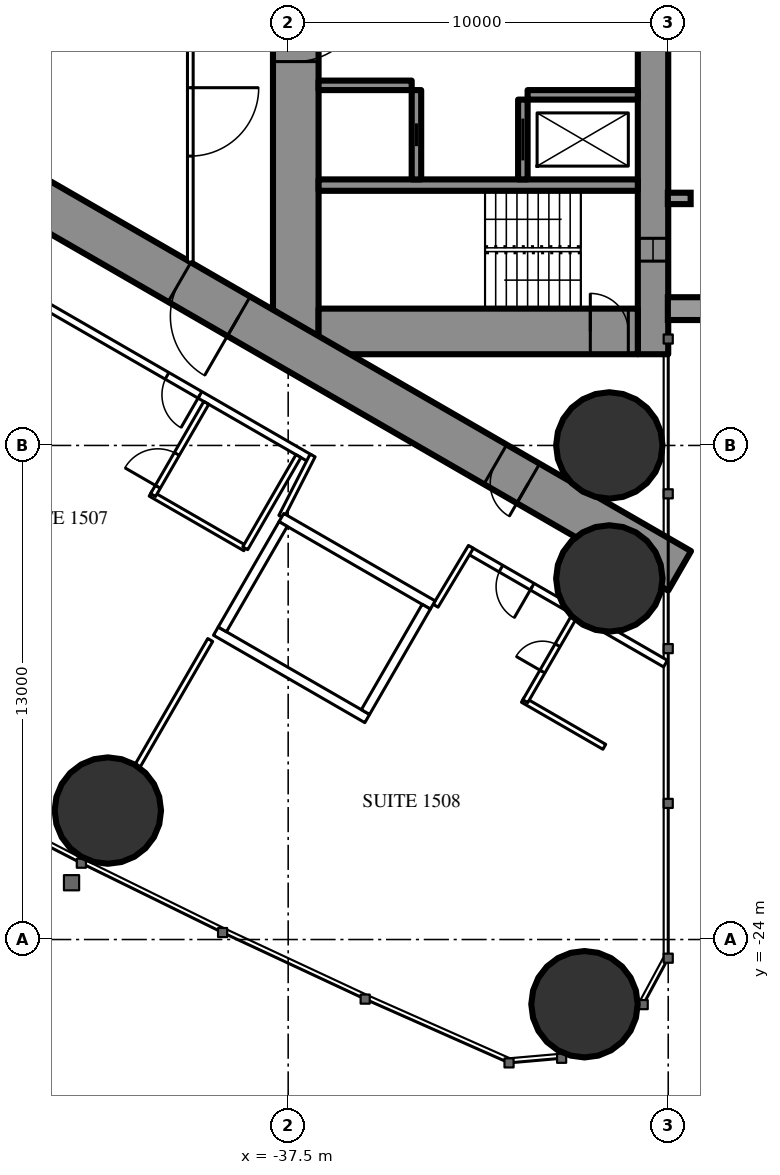
"""IFC4 building model, lengths in metres.
Left out: names, types, materials, properties, quantities, classifications, styles, units other than length and angle.
Written with IfcOpenShell. Run it as: python <this file> out.ifc"""

import sys

from ifc_helpers import new_model, si_unit, direction, frame, frame_2d, origin, origin_2d, place, context, subcontext, project, spatial, rectangle, hollow_circle, extrude, element, fill, save


model = new_model("IFC4")
c1 = context("Model", 3, precision=1e-05, world=origin(), true_north=direction((0.0, 1.0)))
c2 = subcontext(c1, "Body", "Model", "MODEL_VIEW")
j1 = project(units=[si_unit("LENGTHUNIT", "METRE"), si_unit("PLANEANGLEUNIT", "RADIAN")], contexts=[c1])
p1 = place(None, origin())
s1 = spatial("IfcSite", under=j1, at=p1, CompositionType="ELEMENT")
p2 = place(p1, origin())
s2 = spatial("IfcBuilding", under=s1, at=p2, CompositionType="ELEMENT")
p3 = place(p2, frame((0.0, 0.0, 60.0)))
s3 = spatial("IfcBuildingStorey", under=s2, at=p3, CompositionType="ELEMENT", Elevation=60.0)
for number, where, z_axis, x_axis in (
    (1, (-29.703, -25.703, 0.0), (0.0, 0.0, 1.0), (1.0, 0.0, 0.0)),
    (2, (-29.05, -11.0, 0.0), (0.0, 0.0, 1.0), (1.0, 0.0, 0.0)),
    (3, (-29.05, -14.5, 0.0), (0.0, 0.0, 1.0), (1.0, 0.0, 0.0)),
    (4, (-42.245, -20.607, 0.0), (0.0, 0.0, 1.0), (1.0, 0.0, 0.0)),
):
    element("IfcColumn", number, at=place(p3, frame(where, z_axis=z_axis, x_axis=x_axis)), inside=s3, PredefinedType="COLUMN", context=c2, shape_type="SweptSolid", body=[
        extrude(hollow_circle(Radius=1.4, WallThickness=0.12, at=origin_2d()), origin(), (0.0, 0.0, 1.0), 3.5),
    ])
p4 = place(p3, frame((-27.9, 8.6, 0.0), z_axis=(0.0, 0.0, 1.0), x_axis=(0.0, -1.0, 0.0)))
e5 = element("IfcWall", 5, at=p4, inside=s3, PredefinedType="SHEAR", context=c2, shape_type="SweptSolid", body=[
    extrude(rectangle(XDim=17.2, YDim=0.8, at=frame_2d((8.6, 0.0))), origin(), (0.0, 0.0, 1.0), 3.5),
])
p5 = place(p4, frame((2.45, 0.0, 0.6)))
e6 = element("IfcOpeningElement", 6, at=p5, cuts=e5, PredefinedType="OPENING", context=c2, shape_type="SweptSolid", body=[
    extrude(rectangle(XDim=0.6, YDim=2.1, at=frame_2d((0.3, 1.05))), frame((0.0, 0.41, 0.0), z_axis=(0.0, -1.0, 0.0), x_axis=(1.0, 0.0, 0.0)), (0.0, 0.0, 1.0), 0.82),
])
p6 = place(p4, frame((14.15, 0.0, 0.6)))
e7 = element("IfcOpeningElement", 7, at=p6, cuts=e5, PredefinedType="OPENING", context=c2, shape_type="SweptSolid", body=[
    extrude(rectangle(XDim=0.6, YDim=2.1, at=frame_2d((0.3, 1.05))), frame((0.0, 0.41, 0.0), z_axis=(0.0, -1.0, 0.0), x_axis=(1.0, 0.0, 0.0)), (0.0, 0.0, 1.0), 0.82),
])
p7 = place(p3, frame((-37.3, 8.6, 0.0), z_axis=(0.0, 0.0, 1.0), x_axis=(0.0, -1.0, 0.0)))
e8 = element("IfcWall", 8, at=p7, inside=s3, PredefinedType="SHEAR", context=c2, shape_type="SweptSolid", body=[
    extrude(rectangle(XDim=17.2, YDim=1.2, at=frame_2d((8.6, 0.0))), origin(), (0.0, 0.0, 1.0), 3.5),
])
p8 = place(p7, frame((7.7, 0.0, 0.0)))
e9 = element("IfcOpeningElement", 9, at=p8, cuts=e8, PredefinedType="OPENING", context=c2, shape_type="SweptSolid", body=[
    extrude(rectangle(XDim=1.8, YDim=2.2, at=frame_2d((0.9, 1.1))), frame((0.0, 0.61, 0.0), z_axis=(0.0, -1.0, 0.0), x_axis=(1.0, 0.0, 0.0)), (0.0, 0.0, 1.0), 1.22),
])
p9 = place(p3, frame((-28.3, -8.0, 0.0), z_axis=(0.0, 0.0, 1.0), x_axis=(-1.0, 0.0, 0.0)))
e10 = element("IfcWall", 10, at=p9, inside=s3, PredefinedType="SHEAR", context=c2, shape_type="SweptSolid", body=[
    extrude(rectangle(XDim=8.4, YDim=1.2, at=frame_2d((4.2, 0.0))), origin(), (0.0, 0.0, 1.0), 3.5),
])
p10 = place(p9, frame((0.25, 0.0, 0.0)))
e11 = element("IfcOpeningElement", 11, at=p10, cuts=e10, PredefinedType="OPENING", context=c2, shape_type="SweptSolid", body=[
    extrude(rectangle(XDim=1.0, YDim=2.2, at=frame_2d((0.5, 1.1))), frame((0.0, 0.61, 0.0), z_axis=(0.0, -1.0, 0.0), x_axis=(1.0, 0.0, 0.0)), (0.0, 0.0, 1.0), 1.22),
])
p11 = place(p3, frame((-28.3, -4.15, 0.0), z_axis=(0.0, 0.0, 1.0), x_axis=(-1.0, 0.0, 0.0)))
e12 = element("IfcWall", 12, at=p11, inside=s3, PredefinedType="SHEAR", context=c2, shape_type="SweptSolid", body=[
    extrude(rectangle(XDim=8.4, YDim=0.3, at=frame_2d((4.2, 0.0))), origin(), (0.0, 0.0, 1.0), 3.5),
])
p12 = place(p3, frame((-31.325, -1.9, 0.0), z_axis=(0.0, 0.0, 1.0), x_axis=(0.0, -1.0, 0.0)))
e13 = element("IfcWall", 13, at=p12, inside=s3, PredefinedType="SHEAR", context=c2, shape_type="SweptSolid", body=[
    extrude(rectangle(XDim=2.1, YDim=0.25, at=frame_2d((1.05, 0.0))), origin(), (0.0, 0.0, 1.0), 3.5),
])
p13 = place(p12, frame((0.5, 0.0, 0.0)))
e14 = element("IfcOpeningElement", 14, at=p13, cuts=e13, PredefinedType="OPENING", context=c2, shape_type="SweptSolid", body=[
    extrude(rectangle(XDim=1.1, YDim=2.2, at=frame_2d((0.55, 1.1))), frame((0.0, 0.135, 0.0), z_axis=(0.0, -1.0, 0.0), x_axis=(1.0, 0.0, 0.0)), (0.0, 0.0, 1.0), 0.27),
])
p14 = place(p3, frame((-34.125, -1.65, 0.0), z_axis=(0.0, 0.0, 1.0), x_axis=(0.0, -1.0, 0.0)))
e15 = element("IfcWall", 15, at=p14, inside=s3, PredefinedType="SHEAR", context=c2, shape_type="SweptSolid", body=[
    extrude(rectangle(XDim=2.35, YDim=0.25, at=frame_2d((1.175, 0.0))), origin(), (0.0, 0.0, 1.0), 3.5),
])
p15 = place(p14, frame((0.875, 0.0, 0.0)))
e16 = element("IfcOpeningElement", 16, at=p15, cuts=e15, PredefinedType="OPENING", context=c2, shape_type="SweptSolid", body=[
    extrude(rectangle(XDim=0.6, YDim=2.0, at=frame_2d((0.3, 1.0))), frame((0.0, 0.135, 0.0), z_axis=(0.0, -1.0, 0.0), x_axis=(1.0, 0.0, 0.0)), (0.0, 0.0, 1.0), 0.27),
])
p16 = place(p3, frame((-28.3, -1.775, 0.0), z_axis=(0.0, 0.0, 1.0), x_axis=(-1.0, 0.0, 0.0)))
e17 = element("IfcWall", 17, at=p16, inside=s3, PredefinedType="SHEAR", context=c2, shape_type="SweptSolid", body=[
    extrude(rectangle(XDim=2.9, YDim=0.25, at=frame_2d((1.45, 0.0))), origin(), (0.0, 0.0, 1.0), 3.5),
])
p17 = place(p3, frame((-34.25, -1.525, 0.0), z_axis=(0.0, 0.0, 1.0), x_axis=(-1.0, 0.0, 0.0)))
e18 = element("IfcWall", 18, at=p17, inside=s3, PredefinedType="SHEAR", context=c2, shape_type="SweptSolid", body=[
    extrude(rectangle(XDim=2.45, YDim=0.25, at=frame_2d((1.225, 0.0))), origin(), (0.0, 0.0, 1.0), 3.5),
])
p18 = place(p3, frame((-27.2, 14.3, 0.0), z_axis=(0.0, 0.0, 1.0), x_axis=(-0.866026593062, -0.499997940104, 0.0)))
e19 = element("IfcWall", 19, at=p18, inside=s3, PredefinedType="SHEAR", context=c2, shape_type="SweptSolid", body=[
    extrude(rectangle(XDim=28.946, YDim=1.2, at=frame_2d((14.473, 0.0))), origin(), (0.0, 0.0, 1.0), 3.5),
])
p19 = place(p18, frame((4.6, 0.0, 0.0)))
e20 = element("IfcOpeningElement", 20, at=p19, cuts=e19, PredefinedType="OPENING", context=c2, shape_type="SweptSolid", body=[
    extrude(rectangle(XDim=1.0, YDim=2.2, at=frame_2d((0.5, 1.1))), frame((0.0, 0.61, 0.0), z_axis=(0.0, -1.0, 0.0), x_axis=(1.0, 0.0, 0.0)), (0.0, 0.0, 1.0), 1.22),
])
p20 = place(p18, frame((13.395, 0.0, 0.0)))
e21 = element("IfcOpeningElement", 21, at=p20, cuts=e19, PredefinedType="OPENING", context=c2, shape_type="SweptSolid", body=[
    extrude(rectangle(XDim=1.8, YDim=2.2, at=frame_2d((0.9, 1.1))), frame((0.0, 0.61, 0.0), z_axis=(0.0, -1.0, 0.0), x_axis=(1.0, 0.0, 0.0)), (0.0, 0.0, 1.0), 1.22),
])
p21 = place(p3, frame((-27.2, -14.3, 0.0), z_axis=(0.0, 0.0, 1.0), x_axis=(-0.866024021859, 0.500002393557, 0.0)))
e22 = element("IfcWall", 22, at=p21, inside=s3, PredefinedType="SHEAR", context=c2, shape_type="SweptSolid", body=[
    extrude(rectangle(XDim=27.907, YDim=1.2, at=frame_2d((13.954, 0.0))), origin(), (0.0, 0.0, 1.0), 3.5),
])
p22 = place(p21, frame((4.6, 0.0, 0.0)))
e23 = element("IfcOpeningElement", 23, at=p22, cuts=e22, PredefinedType="OPENING", context=c2, shape_type="SweptSolid", body=[
    extrude(rectangle(XDim=1.0, YDim=2.2, at=frame_2d((0.5, 1.1))), frame((0.0, 0.61, 0.0), z_axis=(0.0, -1.0, 0.0), x_axis=(1.0, 0.0, 0.0)), (0.0, 0.0, 1.0), 1.22),
])
p23 = place(p21, frame((13.395, 0.0, 0.0)))
e24 = element("IfcOpeningElement", 24, at=p23, cuts=e22, PredefinedType="OPENING", context=c2, shape_type="SweptSolid", body=[
    extrude(rectangle(XDim=1.8, YDim=2.2, at=frame_2d((0.9, 1.1))), frame((0.0, 0.61, 0.0), z_axis=(0.0, -1.0, 0.0), x_axis=(1.0, 0.0, 0.0)), (0.0, 0.0, 1.0), 1.22),
])
p24 = place(p3, frame((-39.551, -16.118, 0.0), z_axis=(0.0, 0.0, 1.0), x_axis=(-0.499986503906, -0.866033195618, 0.0)))
e25 = element("IfcWall", 25, at=p24, inside=s3, PredefinedType="PARTITIONING", context=c2, shape_type="SweptSolid", body=[
    extrude(rectangle(XDim=3.815, YDim=0.15, at=frame_2d((1.907, 0.0))), origin(), (0.0, 0.0, 1.0), 3.25),
])
p25 = place(p3, frame((-27.572, -16.741, 0.0), z_axis=(0.0, 0.0, 1.0), x_axis=(-0.866024464444, 0.500001626982, 0.0)))
e26 = element("IfcWall", 26, at=p25, inside=s3, PredefinedType="PARTITIONING", context=c2, shape_type="SweptSolid", body=[
    extrude(rectangle(XDim=5.955, YDim=0.2, at=frame_2d((2.978, 0.0))), origin(), (0.0, 0.0, 1.0), 3.25),
])
p26 = place(p25, frame((4.05, 0.0, 0.0)))
e27 = element("IfcOpeningElement", 27, at=p26, cuts=e26, PredefinedType="OPENING", context=c2, shape_type="SweptSolid", body=[
    extrude(rectangle(XDim=0.95, YDim=2.2, at=frame_2d((0.475, 1.1))), frame((0.0, 0.11, 0.0), z_axis=(0.0, -1.0, 0.0), x_axis=(1.0, 0.0, 0.0)), (0.0, 0.0, 1.0), 0.22),
])
p27 = place(p3, frame((-36.92, -11.344, 0.0), z_axis=(0.0, 0.0, 1.0), x_axis=(-0.866028313256, 0.499994960614, 0.0)))
e28 = element("IfcWall", 28, at=p27, inside=s3, PredefinedType="PARTITIONING", context=c2, shape_type="SweptSolid", body=[
    extrude(rectangle(XDim=22.568, YDim=0.2, at=frame_2d((11.284, 0.0))), origin(), (0.0, 0.0, 1.0), 3.25),
])
p28 = place(p27, frame((12.68, 0.0, 0.0)))
e29 = element("IfcOpeningElement", 29, at=p28, cuts=e28, PredefinedType="OPENING", context=c2, shape_type="SweptSolid", body=[
    extrude(rectangle(XDim=0.95, YDim=2.2, at=frame_2d((0.475, 1.1))), frame((0.0, 0.11, 0.0), z_axis=(0.0, -1.0, 0.0), x_axis=(1.0, 0.0, 0.0)), (0.0, 0.0, 1.0), 0.22),
])
p29 = place(p27, frame((3.35, 0.0, 0.0)))
e30 = element("IfcOpeningElement", 30, at=p29, cuts=e28, PredefinedType="OPENING", context=c2, shape_type="SweptSolid", body=[
    extrude(rectangle(XDim=1.0, YDim=2.2, at=frame_2d((0.5, 1.1))), frame((0.0, 0.11, 0.0), z_axis=(0.0, -1.0, 0.0), x_axis=(1.0, 0.0, 0.0)), (0.0, 0.0, 1.0), 0.22),
])
p30 = place(p3, frame((-36.857, -11.265, 0.0), z_axis=(0.0, 0.0, 1.0), x_axis=(-0.454225294761, -0.890886851176, 0.0)))
e31 = element("IfcWall", 31, at=p30, inside=s3, PredefinedType="PARTITIONING", context=c2, shape_type="SweptSolid", body=[
    extrude(rectangle(XDim=1.807, YDim=0.15, at=frame_2d((0.904, 0.0))), origin(), (0.0, 0.0, 1.0), 3.25),
])
p31 = place(p3, frame((-33.621, -15.218, 0.0), z_axis=(0.0, 0.0, 1.0), x_axis=(0.514336634837, 0.857588377991, 0.0)))
e32 = element("IfcWall", 32, at=p31, inside=s3, PredefinedType="PARTITIONING", context=c2, shape_type="SweptSolid", body=[
    extrude(rectangle(XDim=1.805, YDim=0.15, at=frame_2d((0.903, 0.0))), origin(), (0.0, 0.0, 1.0), 3.25),
])
p32 = place(p3, frame((-38.63, -13.705, 0.0), z_axis=(0.0, 0.0, 1.0), x_axis=(-0.866018712932, 0.500011588718, 0.0)))
e33 = element("IfcWall", 33, at=p32, inside=s3, PredefinedType="PARTITIONING", context=c2, shape_type="SweptSolid", body=[
    extrude(rectangle(XDim=2.875, YDim=0.15, at=frame_2d((1.438, 0.0))), origin(), (0.0, 0.0, 1.0), 3.25),
])
p33 = place(p3, frame((-39.655, -9.88, 0.0), z_axis=(0.0, 0.0, 1.0), x_axis=(-0.500049511043, -0.865996816683, 0.0)))
e34 = element("IfcWall", 34, at=p33, inside=s3, PredefinedType="PARTITIONING", context=c2, shape_type="SweptSolid", body=[
    extrude(rectangle(XDim=2.8, YDim=0.15, at=frame_2d((1.4, 0.0))), origin(), (0.0, 0.0, 1.0), 3.25),
])
p34 = place(p33, frame((1.55, 0.0, 0.0)))
e35 = element("IfcOpeningElement", 35, at=p34, cuts=e34, PredefinedType="OPENING", context=c2, shape_type="SweptSolid", body=[
    extrude(rectangle(XDim=1.0, YDim=2.2, at=frame_2d((0.5, 1.1))), frame((0.0, 0.085, 0.0), z_axis=(0.0, -1.0, 0.0), x_axis=(1.0, 0.0, 0.0)), (0.0, 0.0, 1.0), 0.17),
])
p35 = place(p3, frame((-37.23, -11.281, 0.0), z_axis=(0.0, 0.0, 1.0), x_axis=(-0.500049511043, -0.865996816683, 0.0)))
e36 = element("IfcWall", 36, at=p35, inside=s3, PredefinedType="PARTITIONING", context=c2, shape_type="SweptSolid", body=[
    extrude(rectangle(XDim=2.8, YDim=0.15, at=frame_2d((1.4, 0.0))), origin(), (0.0, 0.0, 1.0), 3.25),
])
p36 = place(p3, frame((-29.182, -18.929, 0.0), z_axis=(0.0, 0.0, 1.0), x_axis=(-0.866006523861, 0.500032699561, 0.0)))
e37 = element("IfcWall", 37, at=p36, inside=s3, PredefinedType="PARTITIONING", context=c2, shape_type="SweptSolid", body=[
    extrude(rectangle(XDim=2.475, YDim=0.15, at=frame_2d((1.237, 0.0))), origin(), (0.0, 0.0, 1.0), 3.25),
])
p37 = place(p3, frame((-29.96, -15.478, 0.0), z_axis=(0.0, 0.0, 1.0), x_axis=(-0.500006934395, -0.866021400173, 0.0)))
e38 = element("IfcWall", 38, at=p37, inside=s3, PredefinedType="PARTITIONING", context=c2, shape_type="SweptSolid", body=[
    extrude(rectangle(XDim=2.6, YDim=0.15, at=frame_2d((1.3, 0.0))), origin(), (0.0, 0.0, 1.0), 3.25),
])
p38 = place(p37, frame((0.9, 0.0, 0.0)))
e39 = element("IfcOpeningElement", 39, at=p38, cuts=e38, PredefinedType="OPENING", context=c2, shape_type="SweptSolid", body=[
    extrude(rectangle(XDim=0.8, YDim=2.2, at=frame_2d((0.4, 1.1))), frame((0.0, 0.085, 0.0), z_axis=(0.0, -1.0, 0.0), x_axis=(1.0, 0.0, 0.0)), (0.0, 0.0, 1.0), 0.17),
])
p39 = place(p3, frame((-40.075, 1.2, 0.0), z_axis=(0.0, 0.0, 1.0), x_axis=(0.0, -1.0, 0.0)))
e40 = element("IfcWall", 40, at=p39, inside=s3, PredefinedType="PARTITIONING", context=c2, shape_type="SweptSolid", body=[
    extrude(rectangle(XDim=7.374, YDim=0.15, at=frame_2d((3.687, 0.0))), origin(), (0.0, 0.0, 1.0), 3.25),
])
p40 = place(p39, frame((2.787, 0.0, 0.0)))
e41 = element("IfcOpeningElement", 41, at=p40, cuts=e40, PredefinedType="OPENING", context=c2, shape_type="SweptSolid", body=[
    extrude(rectangle(XDim=1.8, YDim=2.2, at=frame_2d((0.9, 1.1))), frame((0.0, 0.085, 0.0), z_axis=(0.0, -1.0, 0.0), x_axis=(1.0, 0.0, 0.0)), (0.0, 0.0, 1.0), 0.17),
])
p41 = place(p3, frame((-33.696, -15.197, 0.0), z_axis=(0.0, 0.0, 1.0), x_axis=(-0.865976953817, 0.500083908417, 0.0)))
e42 = element("IfcWall", 42, at=p41, inside=s3, PredefinedType="PARTITIONING", context=c2, shape_type="SweptSolid", body=[
    extrude(rectangle(XDim=4.599, YDim=0.25, at=frame_2d((2.3, 0.0))), origin(), (0.0, 0.0, 1.0), 3.25),
])
p42 = place(p3, frame((-35.42, -18.186, 0.0), z_axis=(0.0, 0.0, 1.0), x_axis=(-0.865990227814, 0.50006092162, 0.0)))
e43 = element("IfcWall", 43, at=p42, inside=s3, PredefinedType="PARTITIONING", context=c2, shape_type="SweptSolid", body=[
    extrude(rectangle(XDim=4.6, YDim=0.25, at=frame_2d((2.3, 0.0))), origin(), (0.0, 0.0, 1.0), 3.25),
])
p43 = place(p3, frame((-33.866, -15.243, 0.0), z_axis=(0.0, 0.0, 1.0), x_axis=(-0.499929347863, -0.866066190972, 0.0)))
e44 = element("IfcWall", 44, at=p43, inside=s3, PredefinedType="PARTITIONING", context=c2, shape_type="SweptSolid", body=[
    extrude(rectangle(XDim=3.201, YDim=0.25, at=frame_2d((1.6, 0.0))), origin(), (0.0, 0.0, 1.0), 3.25),
])
p44 = place(p3, frame((-37.633, -13.068, 0.0), z_axis=(0.0, 0.0, 1.0), x_axis=(-0.499872130319, -0.866099216793, 0.0)))
e45 = element("IfcWall", 45, at=p44, inside=s3, PredefinedType="PARTITIONING", context=c2, shape_type="SweptSolid", body=[
    extrude(rectangle(XDim=3.2, YDim=0.25, at=frame_2d((1.6, 0.0))), origin(), (0.0, 0.0, 1.0), 3.25),
])
p45 = place(p34, origin())
e46 = element("IfcDoor", 46, at=p45, inside=s3, OperationType="SINGLE_SWING_RIGHT", PredefinedType="DOOR", context=c2, shape_type="SweptSolid", body=[
    extrude(rectangle(XDim=1.0, YDim=2.2, at=frame_2d((0.5, 1.1))), frame((0.0, 0.025, 0.0), z_axis=(0.0, -1.0, 0.0), x_axis=(1.0, 0.0, 0.0)), (0.0, 0.0, 1.0), 0.05),
])
fill(e35, e46)
p46 = place(p29, origin())
e47 = element("IfcDoor", 47, at=p46, inside=s3, OperationType="SINGLE_SWING_LEFT", PredefinedType="DOOR", context=c2, shape_type="SweptSolid", body=[
    extrude(rectangle(XDim=1.0, YDim=2.2, at=frame_2d((0.5, 1.1))), frame((0.0, 0.025, 0.0), z_axis=(0.0, -1.0, 0.0), x_axis=(1.0, 0.0, 0.0)), (0.0, 0.0, 1.0), 0.05),
])
fill(e30, e47)
p47 = place(p38, origin())
e48 = element("IfcDoor", 48, at=p47, inside=s3, OperationType="SINGLE_SWING_RIGHT", PredefinedType="DOOR", context=c2, shape_type="SweptSolid", body=[
    extrude(rectangle(XDim=0.8, YDim=2.2, at=frame_2d((0.4, 1.1))), frame((0.0, 0.025, 0.0), z_axis=(0.0, -1.0, 0.0), x_axis=(1.0, 0.0, 0.0)), (0.0, 0.0, 1.0), 0.05),
])
fill(e39, e48)
p48 = place(p26, origin())
e49 = element("IfcDoor", 49, at=p48, inside=s3, OperationType="SINGLE_SWING_LEFT", PredefinedType="DOOR", context=c2, shape_type="SweptSolid", body=[
    extrude(rectangle(XDim=0.95, YDim=2.2, at=frame_2d((0.475, 1.1))), frame((0.0, 0.025, 0.0), z_axis=(0.0, -1.0, 0.0), x_axis=(1.0, 0.0, 0.0)), (0.0, 0.0, 1.0), 0.05),
])
fill(e27, e49)
p49 = place(p40, origin())
e50 = element("IfcDoor", 50, at=p49, inside=s3, OperationType="DOUBLE_DOOR_SINGLE_SWING", PredefinedType="DOOR", context=c2, shape_type="SweptSolid", body=[
    extrude(rectangle(XDim=1.8, YDim=2.2, at=frame_2d((0.9, 1.1))), frame((0.0, 0.025, 0.0), z_axis=(0.0, -1.0, 0.0), x_axis=(1.0, 0.0, 0.0)), (0.0, 0.0, 1.0), 0.05),
])
fill(e41, e50)
p50 = place(p22, origin())
e51 = element("IfcDoor", 51, at=p50, inside=s3, OperationType="SINGLE_SWING_LEFT", PredefinedType="DOOR", context=c2, shape_type="SweptSolid", body=[
    extrude(rectangle(XDim=1.0, YDim=2.2, at=frame_2d((0.5, 1.1))), frame((0.0, 0.025, 0.0), z_axis=(0.0, -1.0, 0.0), x_axis=(1.0, 0.0, 0.0)), (0.0, 0.0, 1.0), 0.05),
])
fill(e23, e51)
p51 = place(p23, origin())
e52 = element("IfcDoor", 52, at=p51, inside=s3, OperationType="DOUBLE_DOOR_SINGLE_SWING", PredefinedType="DOOR", context=c2, shape_type="SweptSolid", body=[
    extrude(rectangle(XDim=1.8, YDim=2.2, at=frame_2d((0.9, 1.1))), frame((0.0, 0.025, 0.0), z_axis=(0.0, -1.0, 0.0), x_axis=(1.0, 0.0, 0.0)), (0.0, 0.0, 1.0), 0.05),
])
fill(e24, e52)
p52 = place(p8, origin())
e53 = element("IfcDoor", 53, at=p52, inside=s3, OperationType="DOUBLE_DOOR_SINGLE_SWING", PredefinedType="DOOR", context=c2, shape_type="SweptSolid", body=[
    extrude(rectangle(XDim=1.8, YDim=2.2, at=frame_2d((0.9, 1.1))), frame((0.0, 0.025, 0.0), z_axis=(0.0, -1.0, 0.0), x_axis=(1.0, 0.0, 0.0)), (0.0, 0.0, 1.0), 0.05),
])
fill(e9, e53)
p53 = place(p10, origin())
e54 = element("IfcDoor", 54, at=p53, inside=s3, OperationType="SINGLE_SWING_RIGHT", PredefinedType="DOOR", context=c2, shape_type="SweptSolid", body=[
    extrude(rectangle(XDim=1.0, YDim=2.2, at=frame_2d((0.5, 1.1))), frame((0.0, 0.025, 0.0), z_axis=(0.0, -1.0, 0.0), x_axis=(1.0, 0.0, 0.0)), (0.0, 0.0, 1.0), 0.05),
])
fill(e11, e54)
p54 = place(p13, origin())
e55 = element("IfcDoor", 55, at=p54, inside=s3, OperationType="SLIDING_TO_LEFT", PredefinedType="USERDEFINED", context=c2, shape_type="SweptSolid", body=[
    extrude(rectangle(XDim=1.1, YDim=2.2, at=frame_2d((0.55, 1.1))), frame((0.0, 0.025, 0.0), z_axis=(0.0, -1.0, 0.0), x_axis=(1.0, 0.0, 0.0)), (0.0, 0.0, 1.0), 0.05),
])
fill(e14, e55)
p55 = place(p15, origin())
e56 = element("IfcDoor", 56, at=p55, inside=s3, OperationType="SLIDING_TO_LEFT", PredefinedType="DOOR", context=c2, shape_type="SweptSolid", body=[
    extrude(rectangle(XDim=0.6, YDim=2.0, at=frame_2d((0.3, 1.0))), frame((0.0, 0.025, 0.0), z_axis=(0.0, -1.0, 0.0), x_axis=(1.0, 0.0, 0.0)), (0.0, 0.0, 1.0), 0.05),
])
fill(e16, e56)
p56 = place(p6, origin())
e57 = element("IfcWindow", 57, at=p56, inside=s3, PartitioningType="SINGLE_PANEL", PredefinedType="WINDOW", context=c2, shape_type="SweptSolid", body=[
    extrude(rectangle(XDim=0.6, YDim=2.1, at=frame_2d((0.3, 1.05))), frame((0.0, 0.03, 0.0), z_axis=(0.0, -1.0, 0.0), x_axis=(1.0, 0.0, 0.0)), (0.0, 0.0, 1.0), 0.06),
])
fill(e7, e57)
save(model, sys.argv[1])
